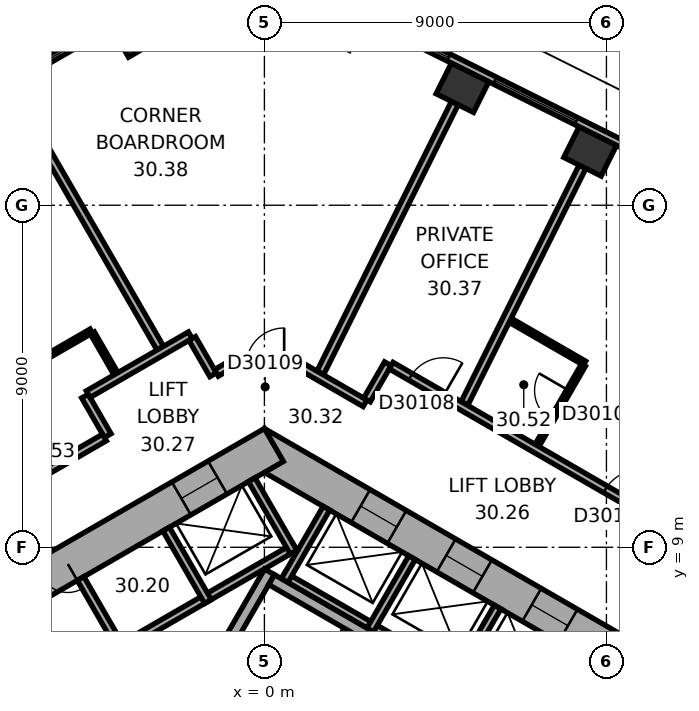
"""IFC4 building model, lengths in metres.
Left out: names, types, materials, properties, quantities, classifications, styles, units other than length and angle.
Written with IfcOpenShell. Run it as: python <this file> out.ifc"""

import sys

from ifc_helpers import new_model, si_unit, direction, frame, frame_2d, origin, origin_2d, place, context, subcontext, project, spatial, rectangle, extrude, element, fill, save


model = new_model("IFC4")
c1 = context("Model", 3, precision=1e-05, world=origin(), true_north=direction((0.0, 1.0)))
c2 = subcontext(c1, "Body", "Model", "MODEL_VIEW")
j1 = project(units=[si_unit("LENGTHUNIT", "METRE"), si_unit("PLANEANGLEUNIT", "RADIAN")], contexts=[c1])
p1 = place(None, origin())
s1 = spatial("IfcSite", under=j1, at=p1, CompositionType="ELEMENT")
p2 = place(p1, origin())
s2 = spatial("IfcBuilding", under=s1, at=p2, CompositionType="ELEMENT")
p3 = place(p2, frame((0.0, 0.0, 124.4)))
s3 = spatial("IfcBuildingStorey", under=s2, at=p3, CompositionType="ELEMENT", Elevation=124.4)
for number, where, z_axis, x_axis in (
    (1, (8.571, 19.416, 0.0), (0.0, 0.0, 1.0), (-0.895, 0.446, 0.0)),
    (2, (5.211, 21.091, 0.0), (0.0, 0.0, 1.0), (-0.895, 0.446, 0.0)),
):
    element("IfcColumn", number, at=place(p3, frame(where, z_axis=z_axis, x_axis=x_axis)), inside=s3, PredefinedType="COLUMN", context=c2, shape_type="SweptSolid", body=[
        extrude(rectangle(XDim=1.1, YDim=0.9, at=origin_2d()), origin(), (0.0, 0.0, 1.0), 3.7),
    ])
p4 = place(p3, frame((-3.238, 22.61, 0.0), z_axis=(0.0, 0.0, 1.0), x_axis=(-0.866025403784, -0.5, 0.0)))
e3 = element("IfcColumn", 3, at=p4, inside=s3, PredefinedType="COLUMN", context=c2, shape_type="SweptSolid", body=[
    extrude(rectangle(XDim=1.3, YDim=0.9, at=origin_2d()), origin(), (0.0, 0.0, 1.0), 3.7),
])
p5 = place(p3, frame((10.25, 5.629, 0.0), z_axis=(0.0, 0.0, 1.0), x_axis=(-0.866022616891, 0.50000482701, 0.0)))
e4 = element("IfcWall", 4, at=p5, inside=s3, PredefinedType="SHEAR", context=c2, shape_type="SweptSolid", body=[
    extrude(rectangle(XDim=12.125, YDim=1.0, at=frame_2d((6.062, 0.0))), origin(), (0.0, 0.0, 1.0), 3.7),
])
p6 = place(p5, frame((2.612, 0.0, 0.0)))
e5 = element("IfcOpeningElement", 5, at=p6, cuts=e4, PredefinedType="OPENING", context=c2, shape_type="SweptSolid", body=[
    extrude(rectangle(XDim=1.1, YDim=2.1, at=frame_2d((0.55, 1.05))), frame((0.0, 0.51, 0.0), z_axis=(0.0, -1.0, 0.0), x_axis=(1.0, 0.0, 0.0)), (0.0, 0.0, 1.0), 1.02),
])
p7 = place(p5, frame((5.212, 0.0, 0.0)))
e6 = element("IfcOpeningElement", 6, at=p7, cuts=e4, PredefinedType="OPENING", context=c2, shape_type="SweptSolid", body=[
    extrude(rectangle(XDim=1.1, YDim=2.1, at=frame_2d((0.55, 1.05))), frame((0.0, 0.51, 0.0), z_axis=(0.0, -1.0, 0.0), x_axis=(1.0, 0.0, 0.0)), (0.0, 0.0, 1.0), 1.02),
])
p8 = place(p5, frame((7.812, 0.0, 0.0)))
e7 = element("IfcOpeningElement", 7, at=p8, cuts=e4, PredefinedType="OPENING", context=c2, shape_type="SweptSolid", body=[
    extrude(rectangle(XDim=1.1, YDim=2.1, at=frame_2d((0.55, 1.05))), frame((0.0, 0.51, 0.0), z_axis=(0.0, -1.0, 0.0), x_axis=(1.0, 0.0, 0.0)), (0.0, 0.0, 1.0), 1.02),
])
p9 = place(p3, frame((0.25, 11.691, 0.0), z_axis=(0.0, 0.0, 1.0), x_axis=(-0.866022616891, -0.50000482701, 0.0)))
e8 = element("IfcWall", 8, at=p9, inside=s3, PredefinedType="SHEAR", context=c2, shape_type="SweptSolid", body=[
    extrude(rectangle(XDim=12.125, YDim=1.0, at=frame_2d((6.062, 0.0))), origin(), (0.0, 0.0, 1.0), 3.7),
])
p10 = place(p9, frame((6.262, 0.0, 0.0)))
e9 = element("IfcOpeningElement", 9, at=p10, cuts=e8, PredefinedType="OPENING", context=c2, shape_type="SweptSolid", body=[
    extrude(rectangle(XDim=1.5, YDim=2.1, at=frame_2d((0.75, 1.05))), frame((0.0, 0.51, 0.0), z_axis=(0.0, -1.0, 0.0), x_axis=(1.0, 0.0, 0.0)), (0.0, 0.0, 1.0), 1.02),
])
p11 = place(p9, frame((1.712, 0.0, 0.0)))
e10 = element("IfcOpeningElement", 10, at=p11, cuts=e8, PredefinedType="OPENING", context=c2, shape_type="SweptSolid", body=[
    extrude(rectangle(XDim=1.1, YDim=2.1, at=frame_2d((0.55, 1.05))), frame((0.0, 0.51, 0.0), z_axis=(0.0, -1.0, 0.0), x_axis=(1.0, 0.0, 0.0)), (0.0, 0.0, 1.0), 1.02),
])
p12 = place(p3, frame((19.464, 14.599, 0.0), z_axis=(0.0, 0.0, 1.0), x_axis=(-0.894935755043, 0.446195018289, 0.0)))
e11 = element("IfcWall", 11, at=p12, inside=s3, PredefinedType="STANDARD", context=c2, shape_type="SweptSolid", body=[
    extrude(rectangle(XDim=20.044, YDim=0.2, at=frame_2d((10.022, 0.0))), origin(), (0.0, 0.0, 1.0), 3.7),
])
p13 = place(p12, frame((1.313, 0.0, 0.9)))
e12 = element("IfcOpeningElement", 12, at=p13, cuts=e11, PredefinedType="OPENING", context=c2, shape_type="SweptSolid", body=[
    extrude(rectangle(XDim=2.4, YDim=2.0, at=frame_2d((1.2, 1.0))), frame((0.0, 0.11, 0.0), z_axis=(0.0, -1.0, 0.0), x_axis=(1.0, 0.0, 0.0)), (0.0, 0.0, 1.0), 0.22),
])
p14 = place(p12, frame((5.067, 0.0, 0.9)))
e13 = element("IfcOpeningElement", 13, at=p14, cuts=e11, PredefinedType="OPENING", context=c2, shape_type="SweptSolid", body=[
    extrude(rectangle(XDim=2.4, YDim=2.0, at=frame_2d((1.2, 1.0))), frame((0.0, 0.11, 0.0), z_axis=(0.0, -1.0, 0.0), x_axis=(1.0, 0.0, 0.0)), (0.0, 0.0, 1.0), 0.22),
])
p15 = place(p12, frame((8.821, 0.0, 0.9)))
e14 = element("IfcOpeningElement", 14, at=p15, cuts=e11, PredefinedType="OPENING", context=c2, shape_type="SweptSolid", body=[
    extrude(rectangle(XDim=2.4, YDim=2.0, at=frame_2d((1.2, 1.0))), frame((0.0, 0.11, 0.0), z_axis=(0.0, -1.0, 0.0), x_axis=(1.0, 0.0, 0.0)), (0.0, 0.0, 1.0), 0.22),
])
p16 = place(p12, frame((12.575, 0.0, 0.9)))
e15 = element("IfcOpeningElement", 15, at=p16, cuts=e11, PredefinedType="OPENING", context=c2, shape_type="SweptSolid", body=[
    extrude(rectangle(XDim=2.4, YDim=2.0, at=frame_2d((1.2, 1.0))), frame((0.0, 0.11, 0.0), z_axis=(0.0, -1.0, 0.0), x_axis=(1.0, 0.0, 0.0)), (0.0, 0.0, 1.0), 0.22),
])
p17 = place(p12, frame((16.329, 0.0, 0.9)))
e16 = element("IfcOpeningElement", 16, at=p17, cuts=e11, PredefinedType="OPENING", context=c2, shape_type="SweptSolid", body=[
    extrude(rectangle(XDim=2.4, YDim=2.0, at=frame_2d((1.2, 1.0))), frame((0.0, 0.11, 0.0), z_axis=(0.0, -1.0, 0.0), x_axis=(1.0, 0.0, 0.0)), (0.0, 0.0, 1.0), 0.22),
])
p18 = place(p3, frame((-2.961, 23.405, 0.0), z_axis=(0.0, 0.0, 1.0), x_axis=(-0.866023315909, -0.500003616288, 0.0)))
e17 = element("IfcWall", 17, at=p18, inside=s3, PredefinedType="STANDARD", context=c2, shape_type="SweptSolid", body=[
    extrude(rectangle(XDim=20.044, YDim=0.2, at=frame_2d((10.022, 0.0))), origin(), (0.0, 0.0, 1.0), 3.7),
])
p19 = place(p18, frame((1.314, 0.0, 0.9)))
e18 = element("IfcOpeningElement", 18, at=p19, cuts=e17, PredefinedType="OPENING", context=c2, shape_type="SweptSolid", body=[
    extrude(rectangle(XDim=2.4, YDim=2.0, at=frame_2d((1.2, 1.0))), frame((0.0, 0.11, 0.0), z_axis=(0.0, -1.0, 0.0), x_axis=(1.0, 0.0, 0.0)), (0.0, 0.0, 1.0), 0.22),
])
p20 = place(p18, frame((5.069, 0.0, 0.9)))
e19 = element("IfcOpeningElement", 19, at=p20, cuts=e17, PredefinedType="OPENING", context=c2, shape_type="SweptSolid", body=[
    extrude(rectangle(XDim=2.4, YDim=2.0, at=frame_2d((1.2, 1.0))), frame((0.0, 0.11, 0.0), z_axis=(0.0, -1.0, 0.0), x_axis=(1.0, 0.0, 0.0)), (0.0, 0.0, 1.0), 0.22),
])
p21 = place(p18, frame((8.823, 0.0, 0.9)))
e20 = element("IfcOpeningElement", 20, at=p21, cuts=e17, PredefinedType="OPENING", context=c2, shape_type="SweptSolid", body=[
    extrude(rectangle(XDim=2.4, YDim=2.0, at=frame_2d((1.2, 1.0))), frame((0.0, 0.11, 0.0), z_axis=(0.0, -1.0, 0.0), x_axis=(1.0, 0.0, 0.0)), (0.0, 0.0, 1.0), 0.22),
])
p22 = place(p18, frame((12.577, 0.0, 0.9)))
e21 = element("IfcOpeningElement", 21, at=p22, cuts=e17, PredefinedType="OPENING", context=c2, shape_type="SweptSolid", body=[
    extrude(rectangle(XDim=2.4, YDim=2.0, at=frame_2d((1.2, 1.0))), frame((0.0, 0.11, 0.0), z_axis=(0.0, -1.0, 0.0), x_axis=(1.0, 0.0, 0.0)), (0.0, 0.0, 1.0), 0.22),
])
p23 = place(p18, frame((16.331, 0.0, 0.9)))
e22 = element("IfcOpeningElement", 22, at=p23, cuts=e17, PredefinedType="OPENING", context=c2, shape_type="SweptSolid", body=[
    extrude(rectangle(XDim=2.4, YDim=2.0, at=frame_2d((1.2, 1.0))), frame((0.0, 0.11, 0.0), z_axis=(0.0, -1.0, 0.0), x_axis=(1.0, 0.0, 0.0)), (0.0, 0.0, 1.0), 0.22),
])
p24 = place(p3, frame((7.424, 4.259, 0.0), z_axis=(0.0, 0.0, 1.0), x_axis=(-0.866026010844, 0.49999894854, 0.0)))
e23 = element("IfcWall", 23, at=p24, inside=s3, PredefinedType="PARTITIONING", context=c2, shape_type="SweptSolid", body=[
    extrude(rectangle(XDim=8.0, YDim=0.2, at=frame_2d((4.0, 0.0))), origin(), (0.0, 0.0, 1.0), 3.42),
])
for number, where, z_axis, x_axis in (
    (24, (5.036, 5.522, 0.0), (0.0, 0.0, 1.0), (0.5, 0.866, 0.0)),
    (25, (2.784, 6.822, 0.0), (0.0, 0.0, 1.0), (0.5, 0.866, 0.0)),
    (26, (0.532, 8.122, 0.0), (0.0, 0.0, 1.0), (0.5, 0.866, 0.0)),
):
    element("IfcWall", number, at=place(p3, frame(where, z_axis=z_axis, x_axis=x_axis)), inside=s3, PredefinedType="PARTITIONING", context=c2, shape_type="SweptSolid", body=[
        extrude(rectangle(XDim=2.2, YDim=0.2, at=frame_2d((1.1, 0.0))), origin(), (0.0, 0.0, 1.0), 3.42),
    ])
p25 = place(p3, frame((0.803, 9.009, 0.0), z_axis=(0.0, 0.0, 1.0), x_axis=(-0.866028230842, -0.499995103361, 0.0)))
e27 = element("IfcWall", 27, at=p25, inside=s3, PredefinedType="PARTITIONING", context=c2, shape_type="SweptSolid", body=[
    extrude(rectangle(XDim=5.4, YDim=0.2, at=frame_2d((2.7, 0.0))), origin(), (0.0, 0.0, 1.0), 3.42),
])
p26 = place(p3, frame((0.767, 8.872, 0.0), z_axis=(0.0, 0.0, 1.0), x_axis=(-0.499994660107, 0.866028486751, 0.0)))
e28 = element("IfcWall", 28, at=p26, inside=s3, PredefinedType="PARTITIONING", context=c2, shape_type="SweptSolid", body=[
    extrude(rectangle(XDim=2.2, YDim=0.2, at=frame_2d((1.1, 0.0))), origin(), (0.0, 0.0, 1.0), 3.42),
])
for number, where, z_axis, x_axis in (
    (29, (-1.485, 7.572, 0.0), (0.0, 0.0, 1.0), (-0.5, 0.866, 0.0)),
    (30, (-3.737, 6.272, 0.0), (0.0, 0.0, 1.0), (-0.5, 0.866, 0.0)),
):
    element("IfcWall", number, at=place(p3, frame(where, z_axis=z_axis, x_axis=x_axis)), inside=s3, PredefinedType="PARTITIONING", context=c2, shape_type="SweptSolid", body=[
        extrude(rectangle(XDim=2.2, YDim=0.2, at=frame_2d((1.1, 0.0))), origin(), (0.0, 0.0, 1.0), 3.42),
    ])
p27 = place(p3, frame((-2.216, 4.282, 0.0), z_axis=(0.0, 0.0, 1.0), x_axis=(0.499977259774, 0.866038532462, 0.0)))
e31 = element("IfcWall", 31, at=p27, inside=s3, PredefinedType="SHEAR", context=c2, shape_type="SweptSolid", body=[
    extrude(rectangle(XDim=4.7, YDim=0.3, at=frame_2d((2.35, 0.0))), origin(), (0.0, 0.0, 1.0), 3.42),
])
p28 = place(p3, frame((6.303, 4.617, 0.0), z_axis=(0.0, 0.0, 1.0), x_axis=(-0.866027801685, 0.499995846692, 0.0)))
e32 = element("IfcWall", 32, at=p28, inside=s3, PredefinedType="SHEAR", context=c2, shape_type="SweptSolid", body=[
    extrude(rectangle(XDim=7.06, YDim=0.3, at=frame_2d((3.53, 0.0))), origin(), (0.0, 0.0, 1.0), 3.42),
])
p29 = place(p3, frame((-5.295, 5.372, 0.0), z_axis=(0.0, 0.0, 1.0), x_axis=(-0.500077893725, 0.86598042715, 0.0)))
e33 = element("IfcWall", 33, at=p29, inside=s3, PredefinedType="SHEAR", context=c2, shape_type="SweptSolid", body=[
    extrude(rectangle(XDim=2.2, YDim=0.3, at=frame_2d((1.1, 0.0))), origin(), (0.0, 0.0, 1.0), 3.42),
])
p30 = place(p29, frame((0.7, 0.0, 0.0)))
e34 = element("IfcOpeningElement", 34, at=p30, cuts=e33, PredefinedType="OPENING", context=c2, shape_type="SweptSolid", body=[
    extrude(rectangle(XDim=1.1, YDim=2.1, at=frame_2d((0.55, 1.05))), frame((0.0, 0.16, 0.0), z_axis=(0.0, -1.0, 0.0), x_axis=(1.0, 0.0, 0.0)), (0.0, 0.0, 1.0), 0.32),
])
p31 = place(p3, frame((-7.328, 13.09, 0.0), z_axis=(0.0, 0.0, 1.0), x_axis=(0.866008981251, 0.500028443584, 0.0)))
e35 = element("IfcWall", 35, at=p31, inside=s3, PredefinedType="PARTITIONING", context=c2, shape_type="SweptSolid", body=[
    extrude(rectangle(XDim=3.2, YDim=0.12, at=frame_2d((1.6, 0.0))), origin(), (0.0, 0.0, 1.0), 3.42),
])
p32 = place(p3, frame((-6.264, 20.344, 0.0), z_axis=(0.0, 0.0, 1.0), x_axis=(0.500009260695, -0.866020057054, 0.0)))
e36 = element("IfcWall", 36, at=p32, inside=s3, PredefinedType="PARTITIONING", context=c2, shape_type="SweptSolid", body=[
    extrude(rectangle(XDim=7.049, YDim=0.2, at=frame_2d((3.524, 0.0))), origin(), (0.0, 0.0, 1.0), 3.42),
])
p33 = place(p3, frame((-4.723, 12.978, 0.0), z_axis=(0.0, 0.0, 1.0), x_axis=(0.500074377092, -0.865982457891, 0.0)))
e37 = element("IfcWall", 37, at=p33, inside=s3, PredefinedType="PARTITIONING", context=c2, shape_type="SweptSolid", body=[
    extrude(rectangle(XDim=1.201, YDim=0.2, at=frame_2d((0.601, 0.0))), origin(), (0.0, 0.0, 1.0), 3.42),
])
p34 = place(p3, frame((-4.526, 14.638, 0.0), z_axis=(0.0, 0.0, 1.0), x_axis=(0.499932836684, -0.86606417707, 0.0)))
e38 = element("IfcWall", 38, at=p34, inside=s3, PredefinedType="PARTITIONING", context=c2, shape_type="SweptSolid", body=[
    extrude(rectangle(XDim=1.239, YDim=0.12, at=frame_2d((0.62, 0.0))), origin(), (0.0, 0.0, 1.0), 3.42),
])
p35 = place(p3, frame((-4.209, 11.888, 0.0), z_axis=(0.0, 0.0, 1.0), x_axis=(-0.866020930448, -0.500007747966, 0.0)))
e39 = element("IfcWall", 39, at=p35, inside=s3, PredefinedType="PARTITIONING", context=c2, shape_type="SweptSolid", body=[
    extrude(rectangle(XDim=8.321, YDim=0.2, at=frame_2d((4.161, 0.0))), origin(), (0.0, 0.0, 1.0), 3.42),
])
p36 = place(p35, frame((3.031, 0.0, 0.0)))
e40 = element("IfcOpeningElement", 40, at=p36, cuts=e39, PredefinedType="OPENING", context=c2, shape_type="SweptSolid", body=[
    extrude(rectangle(XDim=1.0, YDim=2.1, at=frame_2d((0.5, 1.05))), frame((0.0, 0.11, 0.0), z_axis=(0.0, -1.0, 0.0), x_axis=(1.0, 0.0, 0.0)), (0.0, 0.0, 1.0), 0.22),
])
p37 = place(p3, frame((-1.95, 14.579, 0.0), z_axis=(0.0, 0.0, 1.0), x_axis=(-0.866011260204, -0.500024496599, 0.0)))
e41 = element("IfcWall", 41, at=p37, inside=s3, PredefinedType="PARTITIONING", context=c2, shape_type="SweptSolid", body=[
    extrude(rectangle(XDim=3.102, YDim=0.2, at=frame_2d((1.551, 0.0))), origin(), (0.0, 0.0, 1.0), 3.42),
])
p38 = place(p3, frame((-1.349, 13.539, 0.0), z_axis=(0.0, 0.0, 1.0), x_axis=(-0.500074377092, 0.865982457891, 0.0)))
e42 = element("IfcWall", 42, at=p38, inside=s3, PredefinedType="PARTITIONING", context=c2, shape_type="SweptSolid", body=[
    extrude(rectangle(XDim=1.101, YDim=0.2, at=frame_2d((0.55, 0.0))), origin(), (0.0, 0.0, 1.0), 3.42),
])
p39 = place(p3, frame((-0.95, 13.77, 0.0), z_axis=(0.0, 0.0, 1.0), x_axis=(-0.865904111586, -0.500210025428, 0.0)))
e43 = element("IfcWall", 43, at=p39, inside=s3, PredefinedType="PARTITIONING", context=c2, shape_type="SweptSolid", body=[
    extrude(rectangle(XDim=0.361, YDim=0.2, at=frame_2d((0.181, 0.0))), origin(), (0.0, 0.0, 1.0), 3.42),
])
p40 = place(p3, frame((0.95, 13.77, 0.0), z_axis=(0.0, 0.0, 1.0), x_axis=(-1.0, 0.0, 0.0)))
e44 = element("IfcWall", 44, at=p40, inside=s3, PredefinedType="PARTITIONING", context=c2, shape_type="SweptSolid", body=[
    extrude(rectangle(XDim=1.86, YDim=0.2, at=frame_2d((0.93, 0.0))), origin(), (0.0, 0.0, 1.0), 3.42),
])
p41 = place(p40, frame((0.43, 0.0, 0.0)))
e45 = element("IfcOpeningElement", 45, at=p41, cuts=e44, PredefinedType="OPENING", context=c2, shape_type="SweptSolid", body=[
    extrude(rectangle(XDim=1.0, YDim=2.1, at=frame_2d((0.5, 1.05))), frame((0.0, 0.11, 0.0), z_axis=(0.0, -1.0, 0.0), x_axis=(1.0, 0.0, 0.0)), (0.0, 0.0, 1.0), 0.22),
])
p42 = place(p3, frame((2.648, 12.789, 0.0), z_axis=(0.0, 0.0, 1.0), x_axis=(-0.8660607342, 0.499938800931, 0.0)))
e46 = element("IfcWall", 46, at=p42, inside=s3, PredefinedType="PARTITIONING", context=c2, shape_type="SweptSolid", body=[
    extrude(rectangle(XDim=1.921, YDim=0.2, at=frame_2d((0.96, 0.0))), origin(), (0.0, 0.0, 1.0), 3.42),
])
p43 = place(p3, frame((3.249, 13.829, 0.0), z_axis=(0.0, 0.0, 1.0), x_axis=(-0.499812034598, -0.866133898465, 0.0)))
e47 = element("IfcWall", 47, at=p43, inside=s3, PredefinedType="PARTITIONING", context=c2, shape_type="SweptSolid", body=[
    extrude(rectangle(XDim=1.101, YDim=0.2, at=frame_2d((0.551, 0.0))), origin(), (0.0, 0.0, 1.0), 3.42),
])
p44 = place(p3, frame((5.01, 20.688, 0.0), z_axis=(0.0, 0.0, 1.0), x_axis=(-0.446203062394, -0.894931744386, 0.0)))
e48 = element("IfcWall", 48, at=p44, inside=s3, PredefinedType="PARTITIONING", context=c2, shape_type="SweptSolid", body=[
    extrude(rectangle(XDim=7.927, YDim=0.2, at=frame_2d((3.963, 0.0))), origin(), (0.0, 0.0, 1.0), 2.87),
])
p45 = place(p3, frame((6.468, 14.973, 0.0), z_axis=(0.0, 0.0, 1.0), x_axis=(0.865993004593, -0.500056112848, 0.0)))
e49 = element("IfcWall", 49, at=p45, inside=s3, PredefinedType="PARTITIONING", context=c2, shape_type="SweptSolid", body=[
    extrude(rectangle(XDim=2.259, YDim=0.12, at=frame_2d((1.129, 0.0))), origin(), (0.0, 0.0, 1.0), 3.42),
])
p46 = place(p3, frame((8.37, 19.013, 0.0), z_axis=(0.0, 0.0, 1.0), x_axis=(-0.446187985757, -0.894939261272, 0.0)))
e50 = element("IfcWall", 50, at=p46, inside=s3, PredefinedType="PARTITIONING", context=c2, shape_type="SweptSolid", body=[
    extrude(rectangle(XDim=6.953, YDim=0.2, at=frame_2d((3.477, 0.0))), origin(), (0.0, 0.0, 1.0), 3.42),
])
p47 = place(p3, frame((8.394, 13.792, 0.0), z_axis=(0.0, 0.0, 1.0), x_axis=(-0.500002508028, -0.866023955769, 0.0)))
e51 = element("IfcWall", 51, at=p47, inside=s3, PredefinedType="PARTITIONING", context=c2, shape_type="SweptSolid", body=[
    extrude(rectangle(XDim=2.44, YDim=0.12, at=frame_2d((1.22, 0.0))), origin(), (0.0, 0.0, 1.0), 3.42),
])
p48 = place(p47, frame((0.77, 0.0, 0.0)))
e52 = element("IfcOpeningElement", 52, at=p48, cuts=e51, PredefinedType="OPENING", context=c2, shape_type="SweptSolid", body=[
    extrude(rectangle(XDim=0.9, YDim=2.1, at=frame_2d((0.45, 1.05))), frame((0.0, 0.07, 0.0), z_axis=(0.0, -1.0, 0.0), x_axis=(1.0, 0.0, 0.0)), (0.0, 0.0, 1.0), 0.14),
])
p49 = place(p3, frame((11.646, 8.981, 0.0), z_axis=(0.0, 0.0, 1.0), x_axis=(-0.866027142779, 0.499996987961, 0.0)))
e53 = element("IfcWall", 53, at=p49, inside=s3, PredefinedType="PARTITIONING", context=c2, shape_type="SweptSolid", body=[
    extrude(rectangle(XDim=9.597, YDim=0.2, at=frame_2d((4.798, 0.0))), origin(), (0.0, 0.0, 1.0), 3.42),
])
p50 = place(p49, frame((2.086, 0.0, 0.0)))
e54 = element("IfcOpeningElement", 54, at=p50, cuts=e53, PredefinedType="OPENING", context=c2, shape_type="SweptSolid", body=[
    extrude(rectangle(XDim=1.0, YDim=2.1, at=frame_2d((0.5, 1.05))), frame((0.0, 0.11, 0.0), z_axis=(0.0, -1.0, 0.0), x_axis=(1.0, 0.0, 0.0)), (0.0, 0.0, 1.0), 0.22),
])
p51 = place(p49, frame((8.01, 0.0, 0.0)))
e55 = element("IfcOpeningElement", 55, at=p51, cuts=e53, PredefinedType="OPENING", context=c2, shape_type="SweptSolid", body=[
    extrude(rectangle(XDim=1.0, YDim=2.1, at=frame_2d((0.5, 1.05))), frame((0.0, 0.11, 0.0), z_axis=(0.0, -1.0, 0.0), x_axis=(1.0, 0.0, 0.0)), (0.0, 0.0, 1.0), 0.22),
])
p52 = place(p16, origin())
e56 = element("IfcWindow", 56, at=p52, inside=s3, PartitioningType="SINGLE_PANEL", PredefinedType="WINDOW", context=c2, shape_type="SweptSolid", body=[
    extrude(rectangle(XDim=2.4, YDim=2.0, at=frame_2d((1.2, 1.0))), frame((0.0, 0.03, 0.0), z_axis=(0.0, -1.0, 0.0), x_axis=(1.0, 0.0, 0.0)), (0.0, 0.0, 1.0), 0.06),
])
fill(e15, e56)
p53 = place(p17, origin())
e57 = element("IfcWindow", 57, at=p53, inside=s3, PartitioningType="SINGLE_PANEL", PredefinedType="WINDOW", context=c2, shape_type="SweptSolid", body=[
    extrude(rectangle(XDim=2.4, YDim=2.0, at=frame_2d((1.2, 1.0))), frame((0.0, 0.03, 0.0), z_axis=(0.0, -1.0, 0.0), x_axis=(1.0, 0.0, 0.0)), (0.0, 0.0, 1.0), 0.06),
])
fill(e16, e57)
p54 = place(p19, origin())
e58 = element("IfcWindow", 58, at=p54, inside=s3, PartitioningType="SINGLE_PANEL", PredefinedType="WINDOW", context=c2, shape_type="SweptSolid", body=[
    extrude(rectangle(XDim=2.4, YDim=2.0, at=frame_2d((1.2, 1.0))), frame((0.0, 0.03, 0.0), z_axis=(0.0, -1.0, 0.0), x_axis=(1.0, 0.0, 0.0)), (0.0, 0.0, 1.0), 0.06),
])
fill(e18, e58)
p55 = place(p10, origin())
e59 = element("IfcDoor", 59, at=p55, inside=s3, OperationType="DOUBLE_DOOR_SINGLE_SWING", PredefinedType="DOOR", context=c2, shape_type="SweptSolid", body=[
    extrude(rectangle(XDim=1.5, YDim=2.1, at=frame_2d((0.75, 1.05))), frame((0.0, 0.025, 0.0), z_axis=(0.0, -1.0, 0.0), x_axis=(1.0, 0.0, 0.0)), (0.0, 0.0, 1.0), 0.05),
])
fill(e9, e59)
p56 = place(p6, origin())
e60 = element("IfcDoor", 60, at=p56, inside=s3, OperationType="DOUBLE_DOOR_SLIDING", PredefinedType="DOOR", context=c2, shape_type="SweptSolid", body=[
    extrude(rectangle(XDim=1.1, YDim=2.1, at=frame_2d((0.55, 1.05))), frame((0.0, 0.025, 0.0), z_axis=(0.0, -1.0, 0.0), x_axis=(1.0, 0.0, 0.0)), (0.0, 0.0, 1.0), 0.05),
])
fill(e5, e60)
p57 = place(p7, origin())
e61 = element("IfcDoor", 61, at=p57, inside=s3, OperationType="DOUBLE_DOOR_SLIDING", PredefinedType="DOOR", context=c2, shape_type="SweptSolid", body=[
    extrude(rectangle(XDim=1.1, YDim=2.1, at=frame_2d((0.55, 1.05))), frame((0.0, 0.025, 0.0), z_axis=(0.0, -1.0, 0.0), x_axis=(1.0, 0.0, 0.0)), (0.0, 0.0, 1.0), 0.05),
])
fill(e6, e61)
p58 = place(p8, origin())
e62 = element("IfcDoor", 62, at=p58, inside=s3, OperationType="DOUBLE_DOOR_SLIDING", PredefinedType="DOOR", context=c2, shape_type="SweptSolid", body=[
    extrude(rectangle(XDim=1.1, YDim=2.1, at=frame_2d((0.55, 1.05))), frame((0.0, 0.025, 0.0), z_axis=(0.0, -1.0, 0.0), x_axis=(1.0, 0.0, 0.0)), (0.0, 0.0, 1.0), 0.05),
])
fill(e7, e62)
p59 = place(p11, origin())
e63 = element("IfcDoor", 63, at=p59, inside=s3, OperationType="DOUBLE_DOOR_SLIDING", PredefinedType="DOOR", context=c2, shape_type="SweptSolid", body=[
    extrude(rectangle(XDim=1.1, YDim=2.1, at=frame_2d((0.55, 1.05))), frame((0.0, 0.025, 0.0), z_axis=(0.0, -1.0, 0.0), x_axis=(1.0, 0.0, 0.0)), (0.0, 0.0, 1.0), 0.05),
])
fill(e10, e63)
p60 = place(p50, origin())
e64 = element("IfcDoor", 64, at=p60, inside=s3, OperationType="SINGLE_SWING_LEFT", PredefinedType="DOOR", context=c2, shape_type="SweptSolid", body=[
    extrude(rectangle(XDim=1.0, YDim=2.1, at=frame_2d((0.5, 1.05))), frame((0.0, 0.025, 0.0), z_axis=(0.0, -1.0, 0.0), x_axis=(1.0, 0.0, 0.0)), (0.0, 0.0, 1.0), 0.05),
])
fill(e54, e64)
p61 = place(p48, origin())
e65 = element("IfcDoor", 65, at=p61, inside=s3, OperationType="SINGLE_SWING_LEFT", PredefinedType="DOOR", context=c2, shape_type="SweptSolid", body=[
    extrude(rectangle(XDim=0.9, YDim=2.1, at=frame_2d((0.45, 1.05))), frame((0.0, 0.025, 0.0), z_axis=(0.0, -1.0, 0.0), x_axis=(1.0, 0.0, 0.0)), (0.0, 0.0, 1.0), 0.05),
])
fill(e52, e65)
p62 = place(p51, origin())
e66 = element("IfcDoor", 66, at=p62, inside=s3, OperationType="SINGLE_SWING_LEFT", PredefinedType="DOOR", context=c2, shape_type="SweptSolid", body=[
    extrude(rectangle(XDim=1.0, YDim=2.1, at=frame_2d((0.5, 1.05))), frame((0.0, 0.025, 0.0), z_axis=(0.0, -1.0, 0.0), x_axis=(1.0, 0.0, 0.0)), (0.0, 0.0, 1.0), 0.05),
])
fill(e55, e66)
p63 = place(p41, origin())
e67 = element("IfcDoor", 67, at=p63, inside=s3, OperationType="SINGLE_SWING_LEFT", PredefinedType="DOOR", context=c2, shape_type="SweptSolid", body=[
    extrude(rectangle(XDim=1.0, YDim=2.1, at=frame_2d((0.5, 1.05))), frame((0.0, 0.025, 0.0), z_axis=(0.0, -1.0, 0.0), x_axis=(1.0, 0.0, 0.0)), (0.0, 0.0, 1.0), 0.05),
])
fill(e45, e67)
save(model, sys.argv[1])
